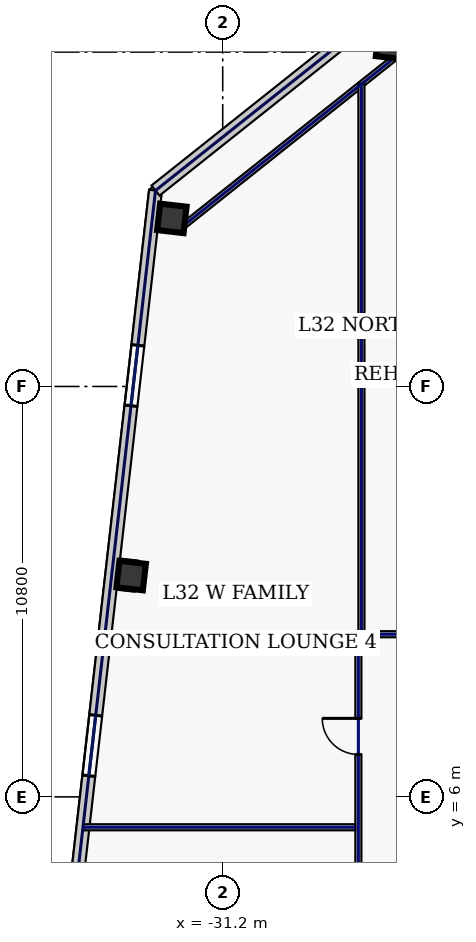
"""IFC4 building model, lengths in metres.
Left out: names, types, materials, properties, quantities, classifications, styles, units other than length and angle.
Written with IfcOpenShell. Run it as: python <this file> out.ifc"""

import sys

from ifc_helpers import new_model, si_unit, direction, frame, frame_2d, origin, origin_2d, place, context, subcontext, project, spatial, rectangle, hollow_rectangle, extrude, element, fill, save


model = new_model("IFC4")
c1 = context("Model", 3, precision=1e-05, world=origin(), true_north=direction((0.0, 1.0)))
c2 = subcontext(c1, "Body", "Model", "MODEL_VIEW")
j1 = project(units=[si_unit("LENGTHUNIT", "METRE"), si_unit("PLANEANGLEUNIT", "RADIAN")], contexts=[c1])
p1 = place(None, origin())
s1 = spatial("IfcSite", under=j1, at=p1, CompositionType="ELEMENT")
p2 = place(p1, origin())
s2 = spatial("IfcBuilding", under=s1, at=p2, CompositionType="ELEMENT")
p3 = place(p2, frame((0.0, 0.0, 141.4)))
s3 = spatial("IfcBuildingStorey", under=s2, at=p3, CompositionType="ELEMENT", Elevation=141.4)
for number, where, z_axis, x_axis in (
    (1, (-26.783, 25.801, 0.0), (0.0, 0.0, 1.0), (0.994, -0.113, 0.0)),
    (2, (-32.538, 21.223, 0.0), (0.0, 0.0, 1.0), (0.994, -0.113, 0.0)),
    (3, (-33.609, 11.824, 0.0), (0.0, 0.0, 1.0), (0.994, -0.113, 0.0)),
):
    element("IfcColumn", number, at=place(p3, frame(where, z_axis=z_axis, x_axis=x_axis)), inside=s3, PredefinedType="COLUMN", context=c2, shape_type="SweptSolid", body=[
        extrude(hollow_rectangle(XDim=0.7, YDim=0.7, WallThickness=0.032, at=origin_2d()), origin(), (0.0, 0.0, 1.0), 4.48),
    ])
p4 = place(p3, frame((-7.01, 24.062, 0.0), z_axis=(0.0, 0.0, 1.0), x_axis=(-0.993571877006, 0.113203026563, 0.0)))
e4 = element("IfcWall", 4, at=p4, inside=s3, PredefinedType="STANDARD", context=c2, shape_type="SweptSolid", body=[
    extrude(rectangle(XDim=20.523, YDim=0.34, at=frame_2d((10.261, 0.0))), origin(), (0.0, 0.0, 1.0), 2.875),
])
p5 = place(p4, frame((16.565, 0.0, 0.22)))
e5 = element("IfcOpeningElement", 5, at=p5, cuts=e4, PredefinedType="OPENING", context=c2, shape_type="SweptSolid", body=[
    extrude(rectangle(XDim=1.6, YDim=1.2, at=frame_2d((0.8, 0.6))), frame((0.0, 0.18, 0.0), z_axis=(0.0, -1.0, 0.0), x_axis=(1.0, 0.0, 0.0)), (0.0, 0.0, 1.0), 0.36),
])
p6 = place(p4, frame((12.344, 0.0, 0.22)))
e6 = element("IfcOpeningElement", 6, at=p6, cuts=e4, PredefinedType="OPENING", context=c2, shape_type="SweptSolid", body=[
    extrude(rectangle(XDim=1.6, YDim=1.2, at=frame_2d((0.8, 0.6))), frame((0.0, 0.18, 0.0), z_axis=(0.0, -1.0, 0.0), x_axis=(1.0, 0.0, 0.0)), (0.0, 0.0, 1.0), 0.36),
])
p7 = place(p4, frame((7.388, 0.0, 0.22)))
e7 = element("IfcOpeningElement", 7, at=p7, cuts=e4, PredefinedType="OPENING", context=c2, shape_type="SweptSolid", body=[
    extrude(rectangle(XDim=1.6, YDim=1.2, at=frame_2d((0.8, 0.6))), frame((0.0, 0.18, 0.0), z_axis=(0.0, -1.0, 0.0), x_axis=(1.0, 0.0, 0.0)), (0.0, 0.0, 1.0), 0.36),
])
p8 = place(p4, frame((3.167, 0.0, 0.22)))
e8 = element("IfcOpeningElement", 8, at=p8, cuts=e4, PredefinedType="OPENING", context=c2, shape_type="SweptSolid", body=[
    extrude(rectangle(XDim=1.6, YDim=1.2, at=frame_2d((0.8, 0.6))), frame((0.0, 0.18, 0.0), z_axis=(0.0, -1.0, 0.0), x_axis=(1.0, 0.0, 0.0)), (0.0, 0.0, 1.0), 0.36),
])
p9 = place(p3, frame((-32.968, 21.957, 0.0), z_axis=(0.0, 0.0, 1.0), x_axis=(-0.113201605824, -0.993572038877, 0.0)))
e9 = element("IfcWall", 9, at=p9, inside=s3, PredefinedType="STANDARD", context=c2, shape_type="SweptSolid", body=[
    extrude(rectangle(XDim=39.2, YDim=0.34, at=frame_2d((19.6, 0.0))), origin(), (0.0, 0.0, 1.0), 4.48),
])
p10 = place(p9, frame((4.1, 0.0, 0.22)))
e10 = element("IfcOpeningElement", 10, at=p10, cuts=e9, PredefinedType="OPENING", context=c2, shape_type="SweptSolid", body=[
    extrude(rectangle(XDim=1.6, YDim=1.2, at=frame_2d((0.8, 0.6))), frame((0.0, 0.18, 0.0), z_axis=(0.0, -1.0, 0.0), x_axis=(1.0, 0.0, 0.0)), (0.0, 0.0, 1.0), 0.36),
])
p11 = place(p9, frame((13.9, 0.0, 0.22)))
e11 = element("IfcOpeningElement", 11, at=p11, cuts=e9, PredefinedType="OPENING", context=c2, shape_type="SweptSolid", body=[
    extrude(rectangle(XDim=1.6, YDim=1.2, at=frame_2d((0.8, 0.6))), frame((0.0, 0.18, 0.0), z_axis=(0.0, -1.0, 0.0), x_axis=(1.0, 0.0, 0.0)), (0.0, 0.0, 1.0), 0.36),
])
p12 = place(p9, frame((33.5, 0.0, 0.22)))
e12 = element("IfcOpeningElement", 12, at=p12, cuts=e9, PredefinedType="OPENING", context=c2, shape_type="SweptSolid", body=[
    extrude(rectangle(XDim=1.6, YDim=1.2, at=frame_2d((0.8, 0.6))), frame((0.0, 0.18, 0.0), z_axis=(0.0, -1.0, 0.0), x_axis=(1.0, 0.0, 0.0)), (0.0, 0.0, 1.0), 0.36),
])
p13 = place(p3, frame((-27.401, 26.385, 0.0), z_axis=(0.0, 0.0, 1.0), x_axis=(-0.78261359446, -0.622507800567, 0.0)))
e13 = element("IfcWall", 13, at=p13, inside=s3, PredefinedType="STANDARD", context=c2, shape_type="SweptSolid", body=[
    extrude(rectangle(XDim=7.114, YDim=0.34, at=frame_2d((3.557, 0.0))), origin(), (0.0, 0.0, 1.0), 4.48),
])
p14 = place(p3, frame((-26.571, 25.535, 0.0), z_axis=(0.0, 0.0, 1.0), x_axis=(-0.782617962887, -0.622502308564, 0.0)))
e14 = element("IfcWall", 14, at=p14, inside=s3, PredefinedType="PARTITIONING", context=c2, shape_type="SweptSolid", body=[
    extrude(rectangle(XDim=7.354, YDim=0.16, at=frame_2d((3.677, 0.0))), origin(), (0.0, 0.0, 1.0), 2.275),
])
p15 = place(p3, frame((-27.63, -10.015, 0.0), z_axis=(0.0, 0.0, 1.0), x_axis=(0.0, 1.0, 0.0)))
e15 = element("IfcWall", 15, at=p15, inside=s3, PredefinedType="PARTITIONING", context=c2, shape_type="SweptSolid", body=[
    extrude(rectangle(XDim=20.13, YDim=0.16, at=frame_2d((10.065, 0.0))), origin(), (0.0, 0.0, 1.0), 4.48),
])
p16 = place(p15, frame((2.169, 0.0, 0.0)))
e16 = element("IfcOpeningElement", 16, at=p16, cuts=e15, PredefinedType="OPENING", context=c2, shape_type="SweptSolid", body=[
    extrude(rectangle(XDim=0.95, YDim=2.2, at=frame_2d((0.475, 1.1))), frame((0.0, 0.09, 0.0), z_axis=(0.0, -1.0, 0.0), x_axis=(1.0, 0.0, 0.0)), (0.0, 0.0, 1.0), 0.18),
])
p17 = place(p15, frame((6.4, 0.0, 0.0)))
e17 = element("IfcOpeningElement", 17, at=p17, cuts=e15, PredefinedType="OPENING", context=c2, shape_type="SweptSolid", body=[
    extrude(rectangle(XDim=0.95, YDim=2.2, at=frame_2d((0.475, 1.1))), frame((0.0, 0.09, 0.0), z_axis=(0.0, -1.0, 0.0), x_axis=(1.0, 0.0, 0.0)), (0.0, 0.0, 1.0), 0.18),
])
p18 = place(p15, frame((11.9, 0.0, 0.0)))
e18 = element("IfcOpeningElement", 18, at=p18, cuts=e15, PredefinedType="OPENING", context=c2, shape_type="SweptSolid", body=[
    extrude(rectangle(XDim=0.95, YDim=2.2, at=frame_2d((0.475, 1.1))), frame((0.0, 0.09, 0.0), z_axis=(0.0, -1.0, 0.0), x_axis=(1.0, 0.0, 0.0)), (0.0, 0.0, 1.0), 0.18),
])
p19 = place(p15, frame((17.131, 0.0, 0.0)))
e19 = element("IfcOpeningElement", 19, at=p19, cuts=e15, PredefinedType="OPENING", context=c2, shape_type="SweptSolid", body=[
    extrude(rectangle(XDim=0.95, YDim=2.2, at=frame_2d((0.475, 1.1))), frame((0.0, 0.09, 0.0), z_axis=(0.0, -1.0, 0.0), x_axis=(1.0, 0.0, 0.0)), (0.0, 0.0, 1.0), 0.18),
])
p20 = place(p3, frame((-27.465, 10.28, 0.0), z_axis=(0.0, 0.0, 1.0), x_axis=(1.0, 0.0, 0.0)))
e20 = element("IfcWall", 20, at=p20, inside=s3, PredefinedType="PARTITIONING", context=c2, shape_type="SweptSolid", body=[
    extrude(rectangle(XDim=54.93, YDim=0.16, at=frame_2d((27.465, 0.0))), origin(), (0.0, 0.0, 1.0), 4.48),
])
p21 = place(p20, frame((2.044, 0.0, 0.0)))
e21 = element("IfcOpeningElement", 21, at=p21, cuts=e20, PredefinedType="OPENING", context=c2, shape_type="SweptSolid", body=[
    extrude(rectangle(XDim=0.95, YDim=2.2, at=frame_2d((0.475, 1.1))), frame((0.0, 0.09, 0.0), z_axis=(0.0, -1.0, 0.0), x_axis=(1.0, 0.0, 0.0)), (0.0, 0.0, 1.0), 0.18),
])
p22 = place(p20, frame((6.75, 0.0, 0.0)))
e22 = element("IfcOpeningElement", 22, at=p22, cuts=e20, PredefinedType="OPENING", context=c2, shape_type="SweptSolid", body=[
    extrude(rectangle(XDim=1.3, YDim=2.2, at=frame_2d((0.65, 1.1))), frame((0.0, 0.09, 0.0), z_axis=(0.0, -1.0, 0.0), x_axis=(1.0, 0.0, 0.0)), (0.0, 0.0, 1.0), 0.18),
])
p23 = place(p20, frame((14.775, 0.0, 0.0)))
e23 = element("IfcOpeningElement", 23, at=p23, cuts=e20, PredefinedType="OPENING", context=c2, shape_type="SweptSolid", body=[
    extrude(rectangle(XDim=1.05, YDim=2.2, at=frame_2d((0.525, 1.1))), frame((0.0, 0.09, 0.0), z_axis=(0.0, -1.0, 0.0), x_axis=(1.0, 0.0, 0.0)), (0.0, 0.0, 1.0), 0.18),
])
p24 = place(p20, frame((25.275, 0.0, 0.0)))
e24 = element("IfcOpeningElement", 24, at=p24, cuts=e20, PredefinedType="OPENING", context=c2, shape_type="SweptSolid", body=[
    extrude(rectangle(XDim=0.95, YDim=2.2, at=frame_2d((0.475, 1.1))), frame((0.0, 0.09, 0.0), z_axis=(0.0, -1.0, 0.0), x_axis=(1.0, 0.0, 0.0)), (0.0, 0.0, 1.0), 0.18),
])
p25 = place(p20, frame((35.775, 0.0, 0.0)))
e25 = element("IfcOpeningElement", 25, at=p25, cuts=e20, PredefinedType="OPENING", context=c2, shape_type="SweptSolid", body=[
    extrude(rectangle(XDim=0.95, YDim=2.2, at=frame_2d((0.475, 1.1))), frame((0.0, 0.09, 0.0), z_axis=(0.0, -1.0, 0.0), x_axis=(1.0, 0.0, 0.0)), (0.0, 0.0, 1.0), 0.18),
])
p26 = place(p20, frame((44.85, 0.0, 0.0)))
e26 = element("IfcOpeningElement", 26, at=p26, cuts=e20, PredefinedType="OPENING", context=c2, shape_type="SweptSolid", body=[
    extrude(rectangle(XDim=1.45, YDim=2.2, at=frame_2d((0.725, 1.1))), frame((0.0, 0.09, 0.0), z_axis=(0.0, -1.0, 0.0), x_axis=(1.0, 0.0, 0.0)), (0.0, 0.0, 1.0), 0.18),
])
p27 = place(p20, frame((51.706, 0.0, 0.0)))
e27 = element("IfcOpeningElement", 27, at=p27, cuts=e20, PredefinedType="OPENING", context=c2, shape_type="SweptSolid", body=[
    extrude(rectangle(XDim=1.15, YDim=2.2, at=frame_2d((0.575, 1.1))), frame((0.0, 0.09, 0.0), z_axis=(0.0, -1.0, 0.0), x_axis=(1.0, 0.0, 0.0)), (0.0, 0.0, 1.0), 0.18),
])
p28 = place(p3, frame((-27.55, 10.365, 0.0), z_axis=(0.0, 0.0, 1.0), x_axis=(0.0, 1.0, 0.0)))
e28 = element("IfcWall", 28, at=p28, inside=s3, PredefinedType="PARTITIONING", context=c2, shape_type="SweptSolid", body=[
    extrude(rectangle(XDim=14.409, YDim=0.16, at=frame_2d((7.204, 0.0))), origin(), (0.0, 0.0, 1.0), 2.275),
])
p29 = place(p3, frame((-34.857, 5.2, 0.0), z_axis=(0.0, 0.0, 1.0), x_axis=(1.0, 0.0, 0.0)))
e29 = element("IfcWall", 29, at=p29, inside=s3, PredefinedType="PARTITIONING", context=c2, shape_type="SweptSolid", body=[
    extrude(rectangle(XDim=7.142, YDim=0.16, at=frame_2d((3.571, 0.0))), origin(), (0.0, 0.0, 1.0), 4.48),
])
p30 = place(p10, origin())
e30 = element("IfcWindow", 30, at=p30, inside=s3, PartitioningType="SINGLE_PANEL", PredefinedType="WINDOW", context=c2, shape_type="SweptSolid", body=[
    extrude(rectangle(XDim=1.6, YDim=1.2, at=frame_2d((0.8, 0.6))), frame((0.0, 0.03, 0.0), z_axis=(0.0, -1.0, 0.0), x_axis=(1.0, 0.0, 0.0)), (0.0, 0.0, 1.0), 0.06),
])
fill(e10, e30)
p31 = place(p11, origin())
e31 = element("IfcWindow", 31, at=p31, inside=s3, PartitioningType="SINGLE_PANEL", PredefinedType="WINDOW", context=c2, shape_type="SweptSolid", body=[
    extrude(rectangle(XDim=1.6, YDim=1.2, at=frame_2d((0.8, 0.6))), frame((0.0, 0.03, 0.0), z_axis=(0.0, -1.0, 0.0), x_axis=(1.0, 0.0, 0.0)), (0.0, 0.0, 1.0), 0.06),
])
fill(e11, e31)
p32 = place(p19, origin())
e32 = element("IfcDoor", 32, at=p32, inside=s3, OperationType="SINGLE_SWING_RIGHT", PredefinedType="DOOR", context=c2, shape_type="SweptSolid", body=[
    extrude(rectangle(XDim=0.95, YDim=2.2, at=frame_2d((0.475, 1.1))), frame((0.0, 0.025, 0.0), z_axis=(0.0, -1.0, 0.0), x_axis=(1.0, 0.0, 0.0)), (0.0, 0.0, 1.0), 0.05),
])
fill(e19, e32)
save(model, sys.argv[1])
